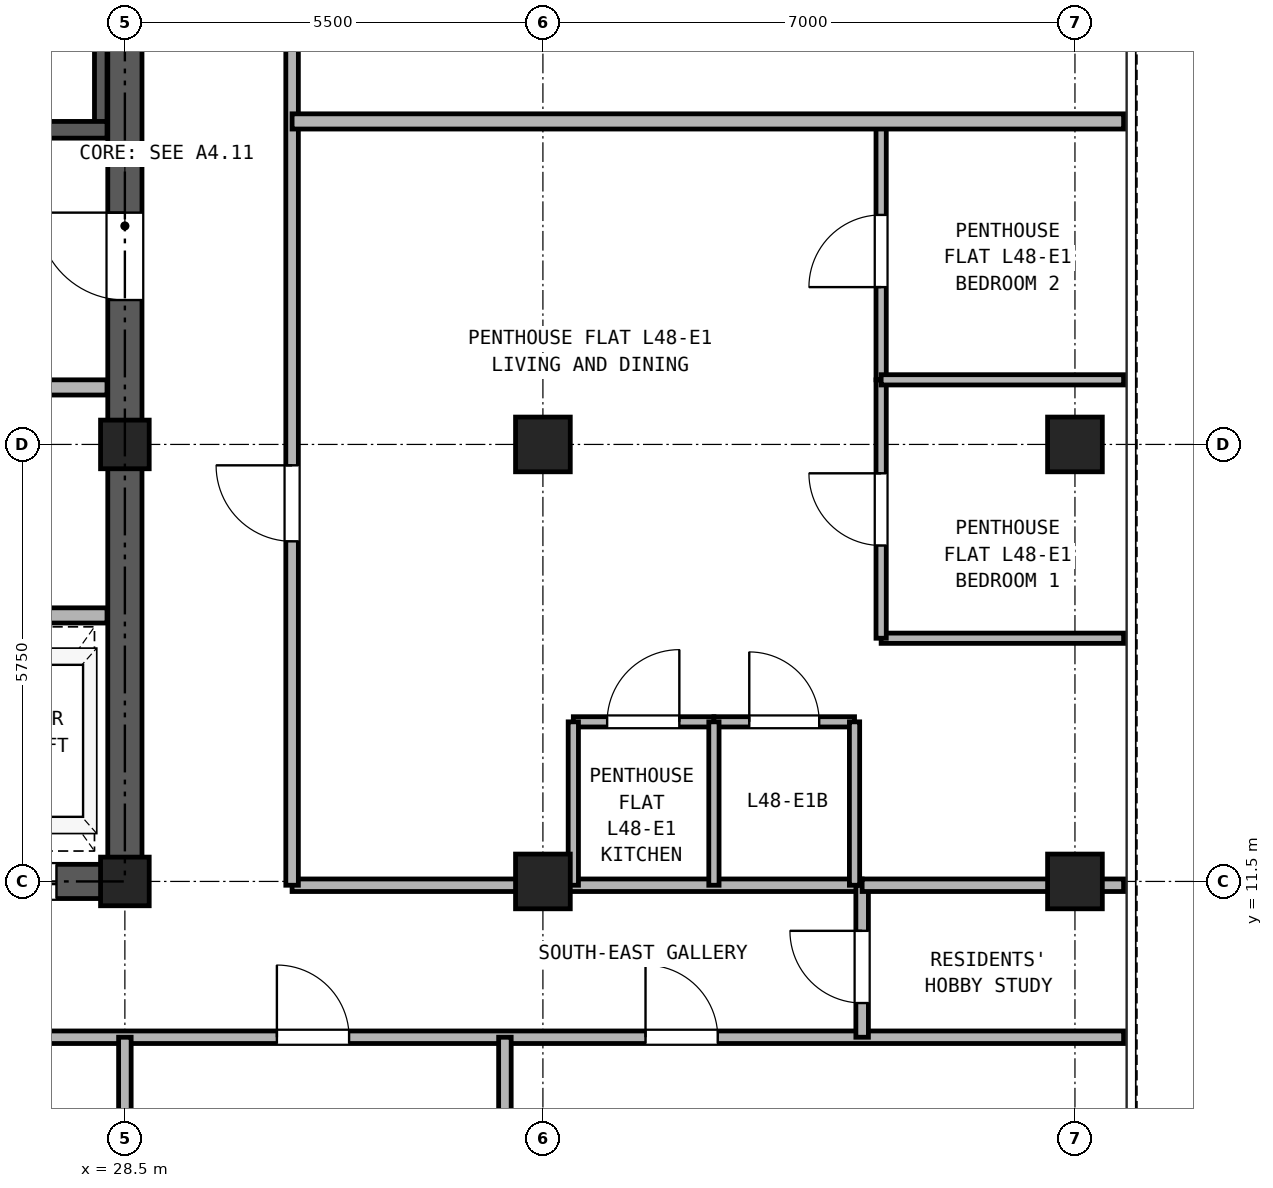
"""IFC4 building model, lengths in metres.
Left out: names, types, materials, properties, quantities, classifications, styles, units other than length and angle.
Written with IfcOpenShell. Run it as: python <this file> out.ifc"""

import sys

from ifc_helpers import new_model, si_unit, direction, frame, frame_2d, origin, origin_2d, place, context, subcontext, project, spatial, rectangle, hollow_rectangle, extrude, source, transform, mapped, element, fill, save


model = new_model("IFC4")
c1 = context("Model", 3, precision=1e-05, world=origin(), true_north=direction((0.0, 1.0)))
c2 = subcontext(c1, "Body", "Model", "MODEL_VIEW")
j1 = project(units=[si_unit("LENGTHUNIT", "METRE"), si_unit("PLANEANGLEUNIT", "RADIAN")], contexts=[c1])
p1 = place(None, origin())
s1 = spatial("IfcSite", under=j1, at=p1, CompositionType="ELEMENT")
p2 = place(p1, origin())
s2 = spatial("IfcBuilding", under=s1, at=p2, CompositionType="ELEMENT")
p3 = place(p2, frame((0.0, 0.0, 172.1)))
s3 = spatial("IfcBuildingStorey", under=s2, at=p3, CompositionType="ELEMENT", Elevation=172.1)
m1 = source(origin(), c2, "Body", "SweptSolid", [
    extrude(hollow_rectangle(XDim=0.72, YDim=0.72, WallThickness=0.04, at=origin_2d()), origin(), (0.0, 0.0, 1.0), 2.95),
])
for number, where, z_axis, x_axis in (
    (1, (41.0, 11.5, 0.0), (0.0, 0.0, 1.0), (1.0, 0.0, 0.0)),
    (2, (41.0, 17.25, 0.0), (0.0, 0.0, 1.0), (1.0, 0.0, 0.0)),
):
    element("IfcColumn", number, at=place(p3, frame(where, z_axis=z_axis, x_axis=x_axis)), inside=s3, PredefinedType="COLUMN", context=c2, shape_type="MappedRepresentation", body=[
        mapped(m1, transform((0.0, 0.0, 0.0), x_axis=(1.0, 0.0, 0.0), y_axis=(0.0, 1.0, 0.0), z_axis=(0.0, 0.0, 1.0), scale=1.0)),
    ])
m2 = source(origin(), c2, "Body", "SweptSolid", [
    extrude(hollow_rectangle(XDim=0.64, YDim=0.64, WallThickness=0.035, at=origin_2d()), origin(), (0.0, 0.0, 1.0), 2.95),
])
for number, where, z_axis, x_axis in (
    (3, (28.5, 11.5, 0.0), (0.0, 0.0, 1.0), (1.0, 0.0, 0.0)),
    (4, (28.5, 17.25, 0.0), (0.0, 0.0, 1.0), (1.0, 0.0, 0.0)),
):
    element("IfcColumn", number, at=place(p3, frame(where, z_axis=z_axis, x_axis=x_axis)), inside=s3, PredefinedType="COLUMN", context=c2, shape_type="MappedRepresentation", body=[
        mapped(m2, transform((0.0, 0.0, 0.0), x_axis=(1.0, 0.0, 0.0), y_axis=(0.0, 1.0, 0.0), z_axis=(0.0, 0.0, 1.0), scale=1.0)),
    ])
for number, where, z_axis, x_axis in (
    (5, (34.0, 11.5, 0.0), (0.0, 0.0, 1.0), (1.0, 0.0, 0.0)),
    (6, (34.0, 17.25, 0.0), (0.0, 0.0, 1.0), (1.0, 0.0, 0.0)),
):
    element("IfcColumn", number, at=place(p3, frame(where, z_axis=z_axis, x_axis=x_axis)), inside=s3, PredefinedType="COLUMN", context=c2, shape_type="MappedRepresentation", body=[
        mapped(m1, transform((0.0, 0.0, 0.0), x_axis=(1.0, 0.0, 0.0), y_axis=(0.0, 1.0, 0.0), z_axis=(0.0, 0.0, 1.0), scale=1.0)),
    ])
p4 = place(p3, frame((18.275, 11.5, 0.0), z_axis=(0.0, 0.0, 1.0), x_axis=(1.0, 0.0, 0.0)))
e7 = element("IfcWall", 7, at=p4, inside=s3, PredefinedType="SHEAR", context=c2, shape_type="SweptSolid", body=[
    extrude(rectangle(XDim=10.45, YDim=0.45, at=frame_2d((5.225, 0.0))), origin(), (0.0, 0.0, 1.0), 2.95),
])
p5 = place(p4, frame((1.825, 0.0, 0.0)))
e8 = element("IfcOpeningElement", 8, at=p5, cuts=e7, PredefinedType="OPENING", context=c2, shape_type="SweptSolid", body=[
    extrude(rectangle(XDim=0.95, YDim=2.15, at=frame_2d((0.475, 1.075))), frame((0.0, 0.235, 0.0), z_axis=(0.0, -1.0, 0.0), x_axis=(1.0, 0.0, 0.0)), (0.0, 0.0, 1.0), 0.47),
])
p6 = place(p4, frame((5.325, 0.0, 0.0)))
e9 = element("IfcOpeningElement", 9, at=p6, cuts=e7, PredefinedType="OPENING", context=c2, shape_type="SweptSolid", body=[
    extrude(rectangle(XDim=0.95, YDim=2.15, at=frame_2d((0.475, 1.075))), frame((0.0, 0.235, 0.0), z_axis=(0.0, -1.0, 0.0), x_axis=(1.0, 0.0, 0.0)), (0.0, 0.0, 1.0), 0.47),
])
p7 = place(p4, frame((8.225, 0.0, 0.0)))
e10 = element("IfcOpeningElement", 10, at=p7, cuts=e7, PredefinedType="OPENING", context=c2, shape_type="SweptSolid", body=[
    extrude(rectangle(XDim=1.1, YDim=2.25, at=frame_2d((0.55, 1.125))), frame((0.0, 0.235, 0.0), z_axis=(0.0, -1.0, 0.0), x_axis=(1.0, 0.0, 0.0)), (0.0, 0.0, 1.0), 0.47),
])
p8 = place(p3, frame((28.5, 11.725, 0.0), z_axis=(0.0, 0.0, 1.0), x_axis=(0.0, 1.0, 0.0)))
e11 = element("IfcWall", 11, at=p8, inside=s3, PredefinedType="SHEAR", context=c2, shape_type="SweptSolid", body=[
    extrude(rectangle(XDim=16.8, YDim=0.45, at=frame_2d((8.4, 0.0))), origin(), (0.0, 0.0, 1.0), 2.95),
])
p9 = place(p8, frame((7.425, 0.0, 0.0)))
e12 = element("IfcOpeningElement", 12, at=p9, cuts=e11, PredefinedType="OPENING", context=c2, shape_type="SweptSolid", body=[
    extrude(rectangle(XDim=1.15, YDim=2.2, at=frame_2d((0.575, 1.1))), frame((0.0, 0.235, 0.0), z_axis=(0.0, -1.0, 0.0), x_axis=(1.0, 0.0, 0.0)), (0.0, 0.0, 1.0), 0.47),
])
p10 = place(p3, frame((28.183, 21.39, 0.0), z_axis=(0.0, 0.0, 1.0), x_axis=(0.0, 1.0, 0.0)))
e13 = element("IfcWall", 13, at=p10, inside=s3, PredefinedType="PARTITIONING", context=c2, shape_type="SweptSolid", body=[
    extrude(rectangle(XDim=6.945, YDim=0.165, at=frame_2d((3.473, 0.0))), origin(), (0.0, 0.0, 1.0), 2.95),
])
p11 = place(p3, frame((25.13, 21.39, 0.0), z_axis=(0.0, 0.0, 1.0), x_axis=(1.0, 0.0, 0.0)))
e14 = element("IfcWall", 14, at=p11, inside=s3, PredefinedType="SOLIDWALL", context=c2, shape_type="SweptSolid", body=[
    extrude(rectangle(XDim=3.135, YDim=0.22, at=frame_2d((1.567, 0.0))), origin(), (0.0, 0.0, 1.0), 2.95),
])
p12 = place(p11, frame((0.92, 0.0, 0.0)))
e15 = element("IfcOpeningElement", 15, at=p12, cuts=e14, PredefinedType="OPENING", context=c2, shape_type="SweptSolid", body=[
    extrude(rectangle(XDim=1.15, YDim=2.2, at=frame_2d((0.575, 1.1))), frame((0.0, 0.12, 0.0), z_axis=(0.0, -1.0, 0.0), x_axis=(1.0, 0.0, 0.0)), (0.0, 0.0, 1.0), 0.24),
])
p13 = place(p3, frame((18.735, 18.0, 0.0), z_axis=(0.0, 0.0, 1.0), x_axis=(1.0, 0.0, 0.0)))
e16 = element("IfcWall", 16, at=p13, inside=s3, PredefinedType="PARTITIONING", context=c2, shape_type="SweptSolid", body=[
    extrude(rectangle(XDim=9.53, YDim=0.2, at=frame_2d((4.765, 0.0))), origin(), (0.0, 0.0, 1.0), 2.95),
])
p14 = place(p13, frame((0.515, 0.0, 0.0)))
e17 = element("IfcOpeningElement", 17, at=p14, cuts=e16, PredefinedType="OPENING", context=c2, shape_type="SweptSolid", body=[
    extrude(rectangle(XDim=1.3, YDim=2.3, at=frame_2d((0.65, 1.15))), frame((0.0, 0.11, 0.0), z_axis=(0.0, -1.0, 0.0), x_axis=(1.0, 0.0, 0.0)), (0.0, 0.0, 1.0), 0.22),
])
p15 = place(p13, frame((2.615, 0.0, 0.0)))
e18 = element("IfcOpeningElement", 18, at=p15, cuts=e16, PredefinedType="OPENING", context=c2, shape_type="SweptSolid", body=[
    extrude(rectangle(XDim=1.3, YDim=2.3, at=frame_2d((0.65, 1.15))), frame((0.0, 0.11, 0.0), z_axis=(0.0, -1.0, 0.0), x_axis=(1.0, 0.0, 0.0)), (0.0, 0.0, 1.0), 0.22),
])
p16 = place(p13, frame((7.115, 0.0, 0.0)))
e19 = element("IfcOpeningElement", 19, at=p16, cuts=e16, PredefinedType="OPENING", context=c2, shape_type="SweptSolid", body=[
    extrude(rectangle(XDim=1.0, YDim=2.15, at=frame_2d((0.5, 1.075))), frame((0.0, 0.11, 0.0), z_axis=(0.0, -1.0, 0.0), x_axis=(1.0, 0.0, 0.0)), (0.0, 0.0, 1.0), 0.22),
])
p17 = place(p3, frame((18.735, 15.0, 0.0), z_axis=(0.0, 0.0, 1.0), x_axis=(1.0, 0.0, 0.0)))
e20 = element("IfcWall", 20, at=p17, inside=s3, PredefinedType="PARTITIONING", context=c2, shape_type="SweptSolid", body=[
    extrude(rectangle(XDim=9.53, YDim=0.2, at=frame_2d((4.765, 0.0))), origin(), (0.0, 0.0, 1.0), 2.95),
])
p18 = place(p3, frame((0.16, 9.45, 0.0), z_axis=(0.0, 0.0, 1.0), x_axis=(1.0, 0.0, 0.0)))
e21 = element("IfcWall", 21, at=p18, inside=s3, PredefinedType="PARTITIONING", context=c2, shape_type="SweptSolid", body=[
    extrude(rectangle(XDim=41.48, YDim=0.165, at=frame_2d((20.74, 0.0))), origin(), (0.0, 0.0, 1.0), 2.95),
])
p19 = place(p18, frame((12.89, 0.0, 0.0)))
e22 = element("IfcOpeningElement", 22, at=p19, cuts=e21, PredefinedType="OPENING", context=c2, shape_type="SweptSolid", body=[
    extrude(rectangle(XDim=0.95, YDim=2.15, at=frame_2d((0.475, 1.075))), frame((0.0, 0.093, 0.0), z_axis=(0.0, -1.0, 0.0), x_axis=(1.0, 0.0, 0.0)), (0.0, 0.0, 1.0), 0.185),
])
p20 = place(p18, frame((23.34, 0.0, 0.0)))
e23 = element("IfcOpeningElement", 23, at=p20, cuts=e21, PredefinedType="OPENING", context=c2, shape_type="SweptSolid", body=[
    extrude(rectangle(XDim=0.95, YDim=2.15, at=frame_2d((0.475, 1.075))), frame((0.0, 0.093, 0.0), z_axis=(0.0, -1.0, 0.0), x_axis=(1.0, 0.0, 0.0)), (0.0, 0.0, 1.0), 0.185),
])
p21 = place(p18, frame((30.34, 0.0, 0.0)))
e24 = element("IfcOpeningElement", 24, at=p21, cuts=e21, PredefinedType="OPENING", context=c2, shape_type="SweptSolid", body=[
    extrude(rectangle(XDim=0.95, YDim=2.15, at=frame_2d((0.475, 1.075))), frame((0.0, 0.093, 0.0), z_axis=(0.0, -1.0, 0.0), x_axis=(1.0, 0.0, 0.0)), (0.0, 0.0, 1.0), 0.185),
])
p22 = place(p18, frame((35.19, 0.0, 0.0)))
e25 = element("IfcOpeningElement", 25, at=p22, cuts=e21, PredefinedType="OPENING", context=c2, shape_type="SweptSolid", body=[
    extrude(rectangle(XDim=0.95, YDim=2.15, at=frame_2d((0.475, 1.075))), frame((0.0, 0.093, 0.0), z_axis=(0.0, -1.0, 0.0), x_axis=(1.0, 0.0, 0.0)), (0.0, 0.0, 1.0), 0.185),
])
p23 = place(p3, frame((30.7, 11.45, 0.0), z_axis=(0.0, 0.0, 1.0), x_axis=(1.0, 0.0, 0.0)))
e26 = element("IfcWall", 26, at=p23, inside=s3, PredefinedType="PARTITIONING", context=c2, shape_type="SweptSolid", body=[
    extrude(rectangle(XDim=7.5, YDim=0.165, at=frame_2d((3.75, 0.0))), origin(), (0.0, 0.0, 1.0), 2.323),
])
p24 = place(p3, frame((38.2, 9.45, 0.0), z_axis=(0.0, 0.0, 1.0), x_axis=(0.0, 1.0, 0.0)))
e27 = element("IfcWall", 27, at=p24, inside=s3, PredefinedType="PARTITIONING", context=c2, shape_type="SweptSolid", body=[
    extrude(rectangle(XDim=2.0, YDim=0.165, at=frame_2d((1.0, 0.0))), origin(), (0.0, 0.0, 1.0), 2.95),
])
p25 = place(p24, frame((0.45, 0.0, 0.0)))
e28 = element("IfcOpeningElement", 28, at=p25, cuts=e27, PredefinedType="OPENING", context=c2, shape_type="SweptSolid", body=[
    extrude(rectangle(XDim=0.95, YDim=2.15, at=frame_2d((0.475, 1.075))), frame((0.0, 0.093, 0.0), z_axis=(0.0, -1.0, 0.0), x_axis=(1.0, 0.0, 0.0)), (0.0, 0.0, 1.0), 0.185),
])
p26 = place(p3, frame((30.7, 11.45, 0.0), z_axis=(0.0, 0.0, 1.0), x_axis=(0.0, 1.0, 0.0)))
e29 = element("IfcWall", 29, at=p26, inside=s3, PredefinedType="PARTITIONING", context=c2, shape_type="SweptSolid", body=[
    extrude(rectangle(XDim=23.69, YDim=0.165, at=frame_2d((11.845, 0.0))), origin(), (0.0, 0.0, 1.0), 2.95),
])
p27 = place(p26, frame((4.525, 0.0, 0.0)))
e30 = element("IfcOpeningElement", 30, at=p27, cuts=e29, PredefinedType="OPENING", context=c2, shape_type="SweptSolid", body=[
    extrude(rectangle(XDim=1.0, YDim=2.15, at=frame_2d((0.5, 1.075))), frame((0.0, 0.093, 0.0), z_axis=(0.0, -1.0, 0.0), x_axis=(1.0, 0.0, 0.0)), (0.0, 0.0, 1.0), 0.185),
])
p28 = place(p26, frame((14.075, 0.0, 0.0)))
e31 = element("IfcOpeningElement", 31, at=p28, cuts=e29, PredefinedType="OPENING", context=c2, shape_type="SweptSolid", body=[
    extrude(rectangle(XDim=1.0, YDim=2.15, at=frame_2d((0.5, 1.075))), frame((0.0, 0.093, 0.0), z_axis=(0.0, -1.0, 0.0), x_axis=(1.0, 0.0, 0.0)), (0.0, 0.0, 1.0), 0.185),
])
p29 = place(p3, frame((28.5, 0.16, 0.0), z_axis=(0.0, 0.0, 1.0), x_axis=(0.0, 1.0, 0.0)))
e32 = element("IfcWall", 32, at=p29, inside=s3, PredefinedType="PARTITIONING", context=c2, shape_type="SweptSolid", body=[
    extrude(rectangle(XDim=9.29, YDim=0.165, at=frame_2d((4.645, 0.0))), origin(), (0.0, 0.0, 1.0), 2.323),
])
p30 = place(p3, frame((33.5, 0.16, 0.0), z_axis=(0.0, 0.0, 1.0), x_axis=(0.0, 1.0, 0.0)))
e33 = element("IfcWall", 33, at=p30, inside=s3, PredefinedType="PARTITIONING", context=c2, shape_type="SweptSolid", body=[
    extrude(rectangle(XDim=9.29, YDim=0.165, at=frame_2d((4.645, 0.0))), origin(), (0.0, 0.0, 1.0), 2.95),
])
p31 = place(p3, frame((38.2, 11.45, 0.0), z_axis=(0.0, 0.0, 1.0), x_axis=(1.0, 0.0, 0.0)))
e34 = element("IfcWall", 34, at=p31, inside=s3, PredefinedType="PARTITIONING", context=c2, shape_type="SweptSolid", body=[
    extrude(rectangle(XDim=3.44, YDim=0.165, at=frame_2d((1.72, 0.0))), origin(), (0.0, 0.0, 1.0), 2.323),
])
p32 = place(p3, frame((34.4, 13.6, 0.0), z_axis=(0.0, 0.0, 1.0), x_axis=(1.0, 0.0, 0.0)))
e35 = element("IfcWall", 35, at=p32, inside=s3, PredefinedType="PARTITIONING", context=c2, shape_type="SweptSolid", body=[
    extrude(rectangle(XDim=1.85, YDim=0.135, at=frame_2d((0.925, 0.0))), origin(), (0.0, 0.0, 1.0), 2.95),
])
p33 = place(p32, frame((0.445, 0.0, 0.0)))
e36 = element("IfcOpeningElement", 36, at=p33, cuts=e35, PredefinedType="OPENING", context=c2, shape_type="SweptSolid", body=[
    extrude(rectangle(XDim=0.95, YDim=2.15, at=frame_2d((0.475, 1.075))), frame((0.0, 0.077, 0.0), z_axis=(0.0, -1.0, 0.0), x_axis=(1.0, 0.0, 0.0)), (0.0, 0.0, 1.0), 0.155),
])
p34 = place(p3, frame((36.25, 13.6, 0.0), z_axis=(0.0, 0.0, 1.0), x_axis=(1.0, 0.0, 0.0)))
e37 = element("IfcWall", 37, at=p34, inside=s3, PredefinedType="PARTITIONING", context=c2, shape_type="SweptSolid", body=[
    extrude(rectangle(XDim=1.85, YDim=0.135, at=frame_2d((0.925, 0.0))), origin(), (0.0, 0.0, 1.0), 2.95),
])
p35 = place(p34, frame((0.465, 0.0, 0.0)))
e38 = element("IfcOpeningElement", 38, at=p35, cuts=e37, PredefinedType="OPENING", context=c2, shape_type="SweptSolid", body=[
    extrude(rectangle(XDim=0.92, YDim=2.1, at=frame_2d((0.46, 1.05))), frame((0.0, 0.077, 0.0), z_axis=(0.0, -1.0, 0.0), x_axis=(1.0, 0.0, 0.0)), (0.0, 0.0, 1.0), 0.155),
])
for number, where, z_axis, x_axis in (
    (39, (34.4, 11.45, 0.0), (0.0, 0.0, 1.0), (0.0, 1.0, 0.0)),
    (40, (36.25, 11.45, 0.0), (0.0, 0.0, 1.0), (0.0, 1.0, 0.0)),
    (41, (38.1, 11.45, 0.0), (0.0, 0.0, 1.0), (0.0, 1.0, 0.0)),
):
    element("IfcWall", number, at=place(p3, frame(where, z_axis=z_axis, x_axis=x_axis)), inside=s3, PredefinedType="PARTITIONING", context=c2, shape_type="SweptSolid", body=[
        extrude(rectangle(XDim=2.15, YDim=0.135, at=frame_2d((1.075, 0.0))), origin(), (0.0, 0.0, 1.0), 2.95),
    ])
p36 = place(p3, frame((38.45, 14.7, 0.0), z_axis=(0.0, 0.0, 1.0), x_axis=(1.0, 0.0, 0.0)))
e42 = element("IfcWall", 42, at=p36, inside=s3, PredefinedType="PARTITIONING", context=c2, shape_type="SweptSolid", body=[
    extrude(rectangle(XDim=3.19, YDim=0.135, at=frame_2d((1.595, 0.0))), origin(), (0.0, 0.0, 1.0), 2.95),
])
p37 = place(p3, frame((38.45, 14.7, 0.0), z_axis=(0.0, 0.0, 1.0), x_axis=(0.0, 1.0, 0.0)))
e43 = element("IfcWall", 43, at=p37, inside=s3, PredefinedType="PARTITIONING", context=c2, shape_type="SweptSolid", body=[
    extrude(rectangle(XDim=3.4, YDim=0.135, at=frame_2d((1.7, 0.0))), origin(), (0.0, 0.0, 1.0), 2.95),
])
p38 = place(p37, frame((1.22, 0.0, 0.0)))
e44 = element("IfcOpeningElement", 44, at=p38, cuts=e43, PredefinedType="OPENING", context=c2, shape_type="SweptSolid", body=[
    extrude(rectangle(XDim=0.95, YDim=2.15, at=frame_2d((0.475, 1.075))), frame((0.0, 0.077, 0.0), z_axis=(0.0, -1.0, 0.0), x_axis=(1.0, 0.0, 0.0)), (0.0, 0.0, 1.0), 0.155),
])
p39 = place(p3, frame((38.45, 18.1, 0.0), z_axis=(0.0, 0.0, 1.0), x_axis=(0.0, 1.0, 0.0)))
e45 = element("IfcWall", 45, at=p39, inside=s3, PredefinedType="PARTITIONING", context=c2, shape_type="SweptSolid", body=[
    extrude(rectangle(XDim=3.4, YDim=0.135, at=frame_2d((1.7, 0.0))), origin(), (0.0, 0.0, 1.0), 2.95),
])
p40 = place(p39, frame((1.22, 0.0, 0.0)))
e46 = element("IfcOpeningElement", 46, at=p40, cuts=e45, PredefinedType="OPENING", context=c2, shape_type="SweptSolid", body=[
    extrude(rectangle(XDim=0.95, YDim=2.15, at=frame_2d((0.475, 1.075))), frame((0.0, 0.077, 0.0), z_axis=(0.0, -1.0, 0.0), x_axis=(1.0, 0.0, 0.0)), (0.0, 0.0, 1.0), 0.155),
])
p41 = place(p3, frame((38.45, 18.1, 0.0), z_axis=(0.0, 0.0, 1.0), x_axis=(1.0, 0.0, 0.0)))
e47 = element("IfcWall", 47, at=p41, inside=s3, PredefinedType="PARTITIONING", context=c2, shape_type="SweptSolid", body=[
    extrude(rectangle(XDim=3.19, YDim=0.135, at=frame_2d((1.595, 0.0))), origin(), (0.0, 0.0, 1.0), 2.95),
])
p42 = place(p3, frame((30.7, 21.5, 0.0), z_axis=(0.0, 0.0, 1.0), x_axis=(1.0, 0.0, 0.0)))
e48 = element("IfcWall", 48, at=p42, inside=s3, PredefinedType="PARTITIONING", context=c2, shape_type="SweptSolid", body=[
    extrude(rectangle(XDim=10.94, YDim=0.2, at=frame_2d((5.47, 0.0))), origin(), (0.0, 0.0, 1.0), 2.95),
])
p43 = place(p9, origin())
e49 = element("IfcDoor", 49, at=p43, inside=s3, OperationType="SINGLE_SWING_RIGHT", PredefinedType="DOOR", context=c2, shape_type="SweptSolid", body=[
    extrude(rectangle(XDim=1.15, YDim=2.2, at=frame_2d((0.575, 1.1))), frame((0.0, 0.025, 0.0), z_axis=(0.0, -1.0, 0.0), x_axis=(1.0, 0.0, 0.0)), (0.0, 0.0, 1.0), 0.05),
])
fill(e12, e49)
p44 = place(p7, frame((1.1, 0.0, 0.0), z_axis=(0.0, 0.0, 1.0), x_axis=(-1.0, 0.0, 0.0)))
e50 = element("IfcDoor", 50, at=p44, inside=s3, OperationType="DOUBLE_DOOR_SLIDING", PredefinedType="DOOR", context=c2, shape_type="SweptSolid", body=[
    extrude(rectangle(XDim=1.1, YDim=2.25, at=frame_2d((0.55, 1.125))), frame((0.0, 0.025, 0.0), z_axis=(0.0, -1.0, 0.0), x_axis=(1.0, 0.0, 0.0)), (0.0, 0.0, 1.0), 0.05),
])
fill(e10, e50)
p45 = place(p21, frame((0.95, 0.0, 0.0), z_axis=(0.0, 0.0, 1.0), x_axis=(-1.0, 0.0, 0.0)))
e51 = element("IfcDoor", 51, at=p45, inside=s3, OperationType="SINGLE_SWING_LEFT", PredefinedType="DOOR", context=c2, shape_type="SweptSolid", body=[
    extrude(rectangle(XDim=0.95, YDim=2.15, at=frame_2d((0.475, 1.075))), frame((0.0, 0.025, 0.0), z_axis=(0.0, -1.0, 0.0), x_axis=(1.0, 0.0, 0.0)), (0.0, 0.0, 1.0), 0.05),
])
fill(e24, e51)
p46 = place(p22, frame((0.95, 0.0, 0.0), z_axis=(0.0, 0.0, 1.0), x_axis=(-1.0, 0.0, 0.0)))
e52 = element("IfcDoor", 52, at=p46, inside=s3, OperationType="SINGLE_SWING_LEFT", PredefinedType="DOOR", context=c2, shape_type="SweptSolid", body=[
    extrude(rectangle(XDim=0.95, YDim=2.15, at=frame_2d((0.475, 1.075))), frame((0.0, 0.025, 0.0), z_axis=(0.0, -1.0, 0.0), x_axis=(1.0, 0.0, 0.0)), (0.0, 0.0, 1.0), 0.05),
])
fill(e25, e52)
p47 = place(p25, origin())
e53 = element("IfcDoor", 53, at=p47, inside=s3, OperationType="SINGLE_SWING_RIGHT", PredefinedType="DOOR", context=c2, shape_type="SweptSolid", body=[
    extrude(rectangle(XDim=0.95, YDim=2.15, at=frame_2d((0.475, 1.075))), frame((0.0, 0.025, 0.0), z_axis=(0.0, -1.0, 0.0), x_axis=(1.0, 0.0, 0.0)), (0.0, 0.0, 1.0), 0.05),
])
fill(e28, e53)
p48 = place(p33, origin())
e54 = element("IfcDoor", 54, at=p48, inside=s3, OperationType="SINGLE_SWING_RIGHT", PredefinedType="DOOR", context=c2, shape_type="SweptSolid", body=[
    extrude(rectangle(XDim=0.95, YDim=2.15, at=frame_2d((0.475, 1.075))), frame((0.0, 0.025, 0.0), z_axis=(0.0, -1.0, 0.0), x_axis=(1.0, 0.0, 0.0)), (0.0, 0.0, 1.0), 0.05),
])
fill(e36, e54)
p49 = place(p35, origin())
e55 = element("IfcDoor", 55, at=p49, inside=s3, OperationType="SINGLE_SWING_LEFT", PredefinedType="DOOR", context=c2, shape_type="SweptSolid", body=[
    extrude(rectangle(XDim=0.92, YDim=2.1, at=frame_2d((0.46, 1.05))), frame((0.0, 0.025, 0.0), z_axis=(0.0, -1.0, 0.0), x_axis=(1.0, 0.0, 0.0)), (0.0, 0.0, 1.0), 0.05),
])
fill(e38, e55)
p50 = place(p38, frame((0.95, 0.0, 0.0), z_axis=(0.0, 0.0, 1.0), x_axis=(-1.0, 0.0, 0.0)))
e56 = element("IfcDoor", 56, at=p50, inside=s3, OperationType="SINGLE_SWING_RIGHT", PredefinedType="DOOR", context=c2, shape_type="SweptSolid", body=[
    extrude(rectangle(XDim=0.95, YDim=2.15, at=frame_2d((0.475, 1.075))), frame((0.0, 0.025, 0.0), z_axis=(0.0, -1.0, 0.0), x_axis=(1.0, 0.0, 0.0)), (0.0, 0.0, 1.0), 0.05),
])
fill(e44, e56)
p51 = place(p40, frame((0.95, 0.0, 0.0), z_axis=(0.0, 0.0, 1.0), x_axis=(-1.0, 0.0, 0.0)))
e57 = element("IfcDoor", 57, at=p51, inside=s3, OperationType="SINGLE_SWING_LEFT", PredefinedType="DOOR", context=c2, shape_type="SweptSolid", body=[
    extrude(rectangle(XDim=0.95, YDim=2.15, at=frame_2d((0.475, 1.075))), frame((0.0, 0.025, 0.0), z_axis=(0.0, -1.0, 0.0), x_axis=(1.0, 0.0, 0.0)), (0.0, 0.0, 1.0), 0.05),
])
fill(e46, e57)
p52 = place(p27, frame((1.0, 0.0, 0.0), z_axis=(0.0, 0.0, 1.0), x_axis=(-1.0, 0.0, 0.0)))
e58 = element("IfcDoor", 58, at=p52, inside=s3, OperationType="SINGLE_SWING_RIGHT", PredefinedType="DOOR", context=c2, shape_type="SweptSolid", body=[
    extrude(rectangle(XDim=1.0, YDim=2.15, at=frame_2d((0.5, 1.075))), frame((0.0, 0.025, 0.0), z_axis=(0.0, -1.0, 0.0), x_axis=(1.0, 0.0, 0.0)), (0.0, 0.0, 1.0), 0.05),
])
fill(e30, e58)
save(model, sys.argv[1])
